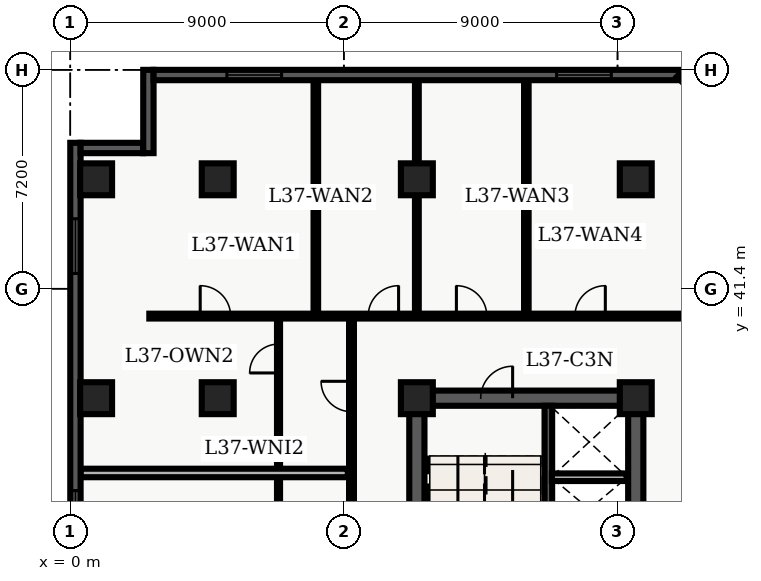
"""IFC4 building model, lengths in metres.
Left out: names, types, materials, properties, quantities, classifications, styles, units other than length and angle.
Written with IfcOpenShell. Run it as: python <this file> out.ifc"""

import sys

from ifc_helpers import new_model, entity, si_unit, converted_unit, direction, frame, origin_with_axes, origin_2d_with_axis, place, context, subcontext, project, spatial, polyline, rectangle, outline, extrude, element, fill, save


model = new_model("IFC4")
c1 = context("Model", 3, precision=1e-05, world=origin_with_axes(), true_north=direction((0.0, 1.0)))
c2 = subcontext(c1, "Body", "Model", "MODEL_VIEW")
j1 = project(units=[si_unit("LENGTHUNIT", "METRE"), converted_unit("PLANEANGLEUNIT", "DEGREE", entity("IfcPlaneAngleMeasure", 0.017), si_unit("PLANEANGLEUNIT", "RADIAN"), dimensions=[0, 0, 0, 0, 0, 0, 0])], contexts=[c1])
p1 = place(None, origin_with_axes())
s1 = spatial("IfcSite", under=j1, at=p1, CompositionType="ELEMENT")
p2 = place(p1, origin_with_axes())
s2 = spatial("IfcBuilding", under=s1, at=p2, CompositionType="ELEMENT")
p3 = place(p2, frame((0.0, 0.0, 152.4), z_axis=(0.0, 0.0, 1.0), x_axis=(1.0, 0.0, 0.0)))
s3 = spatial("IfcBuildingStorey", under=s2, at=p3, CompositionType="ELEMENT", Elevation=152.4)
p4 = place(p3, frame((11.4, 10.8, 0.0), z_axis=(0.0, 0.0, 1.0), x_axis=(0.0, 1.0, 0.0)))
e1 = element("IfcWall", 1, at=p4, inside=s3, PredefinedType="SHEAR", context=c2, shape_type="SweptSolid", body=[
    extrude(outline(polyline([(0.0, -0.25), (27.0, -0.25), (27.0, 0.25), (0.0, 0.25), (0.0, -0.25)])), origin_with_axes(), (0.0, 0.0, 1.0), 3.66),
])
p5 = place(p3, frame((11.4, 37.8, 0.0), z_axis=(0.0, 0.0, 1.0), x_axis=(1.0, 0.0, 0.0)))
e2 = element("IfcWall", 2, at=p5, inside=s3, PredefinedType="SHEAR", context=c2, shape_type="SweptSolid", body=[
    extrude(outline(polyline([(0.0, -0.25), (7.2, -0.25), (7.2, 0.25), (0.0, 0.25), (0.0, -0.25)])), origin_with_axes(), (0.0, 0.0, 1.0), 3.66),
])
p6 = place(p5, frame((2.625, 0.0, 0.0), z_axis=(0.0, 0.0, 1.0), x_axis=(1.0, 0.0, 0.0)))
e3 = element("IfcOpeningElement", 3, at=p6, cuts=e2, PredefinedType="OPENING", context=c2, shape_type="SweptSolid", body=[
    extrude(rectangle(XDim=1.05, YDim=0.52, at=origin_2d_with_axis()), origin_with_axes(), (0.0, 0.0, 1.0), 2.15),
])
p7 = place(p3, frame((18.6, 24.3, 0.0), z_axis=(0.0, 0.0, 1.0), x_axis=(0.0, 1.0, 0.0)))
e4 = element("IfcWall", 4, at=p7, inside=s3, PredefinedType="SHEAR", context=c2, shape_type="SweptSolid", body=[
    extrude(outline(polyline([(0.0, -0.25), (13.5, -0.25), (13.5, 0.25), (0.0, 0.25), (0.0, -0.25)])), origin_with_axes(), (0.0, 0.0, 1.0), 3.66),
])
p8 = place(p7, frame((5.65, 0.0, 0.0), z_axis=(0.0, 0.0, 1.0), x_axis=(1.0, 0.0, 0.0)))
e5 = element("IfcOpeningElement", 5, at=p8, cuts=e4, PredefinedType="OPENING", context=c2, shape_type="SweptSolid", body=[
    extrude(rectangle(XDim=1.1, YDim=0.52, at=origin_2d_with_axis()), origin_with_axes(), (0.0, 0.0, 1.0), 2.15),
])
p9 = place(p7, frame((7.75, 0.0, 0.0), z_axis=(0.0, 0.0, 1.0), x_axis=(1.0, 0.0, 0.0)))
e6 = element("IfcOpeningElement", 6, at=p9, cuts=e4, PredefinedType="OPENING", context=c2, shape_type="SweptSolid", body=[
    extrude(rectangle(XDim=1.1, YDim=0.52, at=origin_2d_with_axis()), origin_with_axes(), (0.0, 0.0, 1.0), 2.15),
])
p10 = place(p3, frame((15.725, 28.9, 0.0), z_axis=(0.0, 0.0, 1.0), x_axis=(0.0, 1.0, 0.0)))
e7 = element("IfcWall", 7, at=p10, inside=s3, PredefinedType="SHEAR", context=c2, shape_type="SweptSolid", body=[
    extrude(outline(polyline([(0.0, -0.125), (8.65, -0.125), (8.65, 0.125), (0.0, 0.125), (0.0, -0.125)])), origin_with_axes(), (0.0, 0.0, 1.0), 3.66),
])
for number, where, z_axis, x_axis in (
    (8, (11.4, 37.8, 0.0), (0.0, 0.0, 1.0), (1.0, 0.0, 0.0)),
    (9, (11.4, 45.0, 0.0), (0.0, 0.0, 1.0), (1.0, 0.0, 0.0)),
    (10, (18.6, 37.8, 0.0), (0.0, 0.0, 1.0), (1.0, 0.0, 0.0)),
    (11, (18.6, 45.0, 0.0), (0.0, 0.0, 1.0), (1.0, 0.0, 0.0)),
    (12, (4.85, 37.8, 0.0), (0.0, 0.0, 1.0), (1.0, 0.0, 0.0)),
    (13, (4.85, 45.0, 0.0), (0.0, 0.0, 1.0), (1.0, 0.0, 0.0)),
    (14, (0.85, 37.8, 0.0), (0.0, 0.0, 1.0), (1.0, 0.0, 0.0)),
    (15, (0.85, 45.0, 0.0), (0.0, 0.0, 1.0), (1.0, 0.0, 0.0)),
):
    element("IfcColumn", number, at=place(p3, frame(where, z_axis=z_axis, x_axis=x_axis)), inside=s3, PredefinedType="COLUMN", context=c2, shape_type="SweptSolid", body=[
        extrude(rectangle(XDim=1.05, YDim=1.05, at=origin_2d_with_axis()), origin_with_axes(), (0.0, 0.0, 1.0), 3.9),
    ])
p11 = place(p3, frame((15.84, 35.2, 0.0), z_axis=(0.0, 0.0, 1.0), x_axis=(1.0, 0.0, 0.0)))
e16 = element("IfcWall", 16, at=p11, inside=s3, PredefinedType="SOLIDWALL", context=c2, shape_type="SweptSolid", body=[
    extrude(outline(polyline([(0.0, -0.125), (2.46, -0.125), (2.46, 0.125), (0.0, 0.125), (0.0, -0.125)])), origin_with_axes(), (0.0, 0.0, 1.0), 2.7),
])
p12 = place(p3, frame((2.6, 40.5, 0.0), z_axis=(0.0, 0.0, 1.0), x_axis=(1.0, 0.0, 0.0)))
e17 = element("IfcWall", 17, at=p12, inside=s3, PredefinedType="PARTITIONING", context=c2, shape_type="SweptSolid", body=[
    extrude(outline(polyline([(0.0, -0.08), (19.792, -0.08), (19.792, 0.08), (0.0, 0.08), (0.0, -0.08)])), origin_with_axes(), (0.0, 0.0, 1.0), 2.7),
])
p13 = place(p12, frame((2.174, 0.0, 0.0), z_axis=(0.0, 0.0, 1.0), x_axis=(1.0, 0.0, 0.0)))
e18 = element("IfcOpeningElement", 18, at=p13, cuts=e17, PredefinedType="OPENING", context=c2, shape_type="SweptSolid", body=[
    extrude(rectangle(XDim=1.0, YDim=0.18, at=origin_2d_with_axis()), origin_with_axes(), (0.0, 0.0, 1.0), 2.15),
])
p14 = place(p12, frame((7.699, 0.0, 0.0), z_axis=(0.0, 0.0, 1.0), x_axis=(1.0, 0.0, 0.0)))
e19 = element("IfcOpeningElement", 19, at=p14, cuts=e17, PredefinedType="OPENING", context=c2, shape_type="SweptSolid", body=[
    extrude(rectangle(XDim=1.0, YDim=0.18, at=origin_2d_with_axis()), origin_with_axes(), (0.0, 0.0, 1.0), 2.15),
])
p15 = place(p12, frame((10.601, 0.0, 0.0), z_axis=(0.0, 0.0, 1.0), x_axis=(1.0, 0.0, 0.0)))
e20 = element("IfcOpeningElement", 20, at=p15, cuts=e17, PredefinedType="OPENING", context=c2, shape_type="SweptSolid", body=[
    extrude(rectangle(XDim=1.0, YDim=0.18, at=origin_2d_with_axis()), origin_with_axes(), (0.0, 0.0, 1.0), 2.15),
])
p16 = place(p12, frame((14.499, 0.0, 0.0), z_axis=(0.0, 0.0, 1.0), x_axis=(1.0, 0.0, 0.0)))
e21 = element("IfcOpeningElement", 21, at=p16, cuts=e17, PredefinedType="OPENING", context=c2, shape_type="SweptSolid", body=[
    extrude(rectangle(XDim=1.0, YDim=0.18, at=origin_2d_with_axis()), origin_with_axes(), (0.0, 0.0, 1.0), 2.15),
])
p17 = place(p3, frame((9.25, 24.4, 0.0), z_axis=(0.0, 0.0, 1.0), x_axis=(0.0, 1.0, 0.0)))
e22 = element("IfcWall", 22, at=p17, inside=s3, PredefinedType="PARTITIONING", context=c2, shape_type="SweptSolid", body=[
    extrude(outline(polyline([(0.0, -0.08), (16.1, -0.08), (16.1, 0.08), (0.0, 0.08), (0.0, -0.08)])), origin_with_axes(), (0.0, 0.0, 1.0), 2.7),
])
p18 = place(p17, frame((5.51, 0.0, 0.0), z_axis=(0.0, 0.0, 1.0), x_axis=(1.0, 0.0, 0.0)))
e23 = element("IfcOpeningElement", 23, at=p18, cuts=e22, PredefinedType="OPENING", context=c2, shape_type="SweptSolid", body=[
    extrude(rectangle(XDim=1.0, YDim=0.18, at=origin_2d_with_axis()), origin_with_axes(), (0.0, 0.0, 1.0), 2.15),
])
p19 = place(p17, frame((13.455, 0.0, 0.0), z_axis=(0.0, 0.0, 1.0), x_axis=(1.0, 0.0, 0.0)))
e24 = element("IfcOpeningElement", 24, at=p19, cuts=e22, PredefinedType="OPENING", context=c2, shape_type="SweptSolid", body=[
    extrude(rectangle(XDim=1.0, YDim=0.18, at=origin_2d_with_axis()), origin_with_axes(), (0.0, 0.0, 1.0), 2.15),
])
p20 = place(p3, frame((6.85, 24.55, 0.0), z_axis=(0.0, 0.0, 1.0), x_axis=(0.0, 1.0, 0.0)))
e25 = element("IfcWall", 25, at=p20, inside=s3, PredefinedType="PARTITIONING", context=c2, shape_type="SweptSolid", body=[
    extrude(outline(polyline([(0.0, -0.05), (15.75, -0.05), (15.75, 0.05), (0.0, 0.05), (0.0, -0.05)])), origin_with_axes(), (0.0, 0.0, 1.0), 2.7),
])
p21 = place(p20, frame((5.36, 0.0, 0.0), z_axis=(0.0, 0.0, 1.0), x_axis=(1.0, 0.0, 0.0)))
e26 = element("IfcOpeningElement", 26, at=p21, cuts=e25, PredefinedType="OPENING", context=c2, shape_type="SweptSolid", body=[
    extrude(rectangle(XDim=0.95, YDim=0.12, at=origin_2d_with_axis()), origin_with_axes(), (0.0, 0.0, 1.0), 2.15),
])
p22 = place(p20, frame((14.555, 0.0, 0.0), z_axis=(0.0, 0.0, 1.0), x_axis=(1.0, 0.0, 0.0)))
e27 = element("IfcOpeningElement", 27, at=p22, cuts=e25, PredefinedType="OPENING", context=c2, shape_type="SweptSolid", body=[
    extrude(rectangle(XDim=0.95, YDim=0.12, at=origin_2d_with_axis()), origin_with_axes(), (0.0, 0.0, 1.0), 2.15),
])
p23 = place(p3, frame((0.335, 35.34, 0.0), z_axis=(0.0, 0.0, 1.0), x_axis=(1.0, 0.0, 0.0)))
e28 = element("IfcWall", 28, at=p23, inside=s3, PredefinedType="PARTITIONING", context=c2, shape_type="SweptSolid", body=[
    extrude(outline(polyline([(0.0, -0.14), (8.795, -0.14), (8.795, 0.14), (0.0, 0.14), (0.0, -0.14)])), origin_with_axes(), (0.0, 0.0, 1.0), 2.7),
])
p24 = place(p3, frame((8.077, 40.6, 0.0), z_axis=(0.0, 0.0, 1.0), x_axis=(0.0, 1.0, 0.0)))
e29 = element("IfcWall", 29, at=p24, inside=s3, PredefinedType="PARTITIONING", context=c2, shape_type="SweptSolid", body=[
    extrude(outline(polyline([(0.0, -0.075), (7.665, -0.075), (7.665, 0.075), (0.0, 0.075), (0.0, -0.075)])), origin_with_axes(), (0.0, 0.0, 1.0), 2.7),
])
p25 = place(p3, frame((11.4, 40.6, 0.0), z_axis=(0.0, 0.0, 1.0), x_axis=(0.0, 1.0, 0.0)))
e30 = element("IfcWall", 30, at=p25, inside=s3, PredefinedType="PARTITIONING", context=c2, shape_type="SweptSolid", body=[
    extrude(outline(polyline([(0.0, -0.062), (7.665, -0.062), (7.665, 0.062), (0.0, 0.062), (0.0, -0.062)])), origin_with_axes(), (0.0, 0.0, 1.0), 2.7),
])
p26 = place(p3, frame((15.001, 40.6, 0.0), z_axis=(0.0, 0.0, 1.0), x_axis=(0.0, 1.0, 0.0)))
e31 = element("IfcWall", 31, at=p26, inside=s3, PredefinedType="PARTITIONING", context=c2, shape_type="SweptSolid", body=[
    extrude(outline(polyline([(0.0, -0.075), (7.665, -0.075), (7.665, 0.075), (0.0, 0.075), (0.0, -0.075)])), origin_with_axes(), (0.0, 0.0, 1.0), 2.7),
])
p27 = place(p3, frame((0.17, 2.74, 0.0), z_axis=(0.0, 0.0, 1.0), x_axis=(0.0, 1.0, 0.0)))
e32 = element("IfcWall", 32, at=p27, inside=s3, PredefinedType="SOLIDWALL", context=c2, shape_type="SweptSolid", body=[
    extrude(outline(polyline([(0.0, -0.17), (43.46, -0.17), (43.46, 0.17), (0.0, 0.17), (0.0, -0.17)])), origin_with_axes(), (0.0, 0.0, 1.0), 3.66),
])
p28 = place(p27, frame((2.948, 0.0, 0.45), z_axis=(0.0, 0.0, 1.0), x_axis=(1.0, 0.0, 0.0)))
e33 = element("IfcOpeningElement", 33, at=p28, cuts=e32, PredefinedType="OPENING", context=c2, shape_type="SweptSolid", body=[
    extrude(rectangle(XDim=1.8, YDim=0.36, at=origin_2d_with_axis()), origin_with_axes(), (0.0, 0.0, 1.0), 2.1),
])
p29 = place(p27, frame((12.339, 0.0, 0.45), z_axis=(0.0, 0.0, 1.0), x_axis=(1.0, 0.0, 0.0)))
e34 = element("IfcOpeningElement", 34, at=p29, cuts=e32, PredefinedType="OPENING", context=c2, shape_type="SweptSolid", body=[
    extrude(rectangle(XDim=1.8, YDim=0.36, at=origin_2d_with_axis()), origin_with_axes(), (0.0, 0.0, 1.0), 2.1),
])
p30 = place(p27, frame((26.426, 0.0, 0.45), z_axis=(0.0, 0.0, 1.0), x_axis=(1.0, 0.0, 0.0)))
e35 = element("IfcOpeningElement", 35, at=p30, cuts=e32, PredefinedType="OPENING", context=c2, shape_type="SweptSolid", body=[
    extrude(rectangle(XDim=1.8, YDim=0.36, at=origin_2d_with_axis()), origin_with_axes(), (0.0, 0.0, 1.0), 2.1),
])
p31 = place(p27, frame((31.121, 0.0, 0.45), z_axis=(0.0, 0.0, 1.0), x_axis=(1.0, 0.0, 0.0)))
e36 = element("IfcOpeningElement", 36, at=p31, cuts=e32, PredefinedType="OPENING", context=c2, shape_type="SweptSolid", body=[
    extrude(rectangle(XDim=1.8, YDim=0.36, at=origin_2d_with_axis()), origin_with_axes(), (0.0, 0.0, 1.0), 2.1),
])
p32 = place(p27, frame((40.062, 0.0, 0.45), z_axis=(0.0, 0.0, 1.0), x_axis=(1.0, 0.0, 0.0)))
e37 = element("IfcOpeningElement", 37, at=p32, cuts=e32, PredefinedType="OPENING", context=c2, shape_type="SweptSolid", body=[
    extrude(rectangle(XDim=1.8, YDim=0.36, at=origin_2d_with_axis()), origin_with_axes(), (0.0, 0.0, 1.0), 2.1),
])
p33 = place(p3, frame((0.34, 46.03, 0.0), z_axis=(0.0, 0.0, 1.0), x_axis=(1.0, 0.0, 0.0)))
e38 = element("IfcWall", 38, at=p33, inside=s3, PredefinedType="SOLIDWALL", context=c2, shape_type="SweptSolid", body=[
    extrude(outline(polyline([(0.0, -0.17), (2.06, -0.17), (2.06, 0.17), (0.0, 0.17), (0.0, -0.17)])), origin_with_axes(), (0.0, 0.0, 1.0), 3.66),
])
p34 = place(p3, frame((2.57, 45.86, 0.0), z_axis=(0.0, 0.0, 1.0), x_axis=(0.0, 1.0, 0.0)))
e39 = element("IfcWall", 39, at=p34, inside=s3, PredefinedType="SOLIDWALL", context=c2, shape_type="SweptSolid", body=[
    extrude(outline(polyline([(0.0, -0.17), (2.74, -0.17), (2.74, 0.17), (0.0, 0.17), (0.0, -0.17)])), origin_with_axes(), (0.0, 0.0, 1.0), 3.66),
])
p35 = place(p3, frame((2.74, 48.43, 0.0), z_axis=(0.0, 0.0, 1.0), x_axis=(1.0, 0.0, 0.0)))
e40 = element("IfcWall", 40, at=p35, inside=s3, PredefinedType="SOLIDWALL", context=c2, shape_type="SweptSolid", body=[
    extrude(outline(polyline([(0.0, -0.17), (17.467, -0.17), (17.467, 0.17), (0.0, 0.17), (0.0, -0.17)])), origin_with_axes(), (0.0, 0.0, 1.0), 3.66),
])
p36 = place(p35, frame((3.311, 0.0, 0.45), z_axis=(0.0, 0.0, 1.0), x_axis=(1.0, 0.0, 0.0)))
e41 = element("IfcOpeningElement", 41, at=p36, cuts=e40, PredefinedType="OPENING", context=c2, shape_type="SweptSolid", body=[
    extrude(rectangle(XDim=1.8, YDim=0.36, at=origin_2d_with_axis()), origin_with_axes(), (0.0, 0.0, 1.0), 2.1),
])
p37 = place(p35, frame((14.156, 0.0, 0.45), z_axis=(0.0, 0.0, 1.0), x_axis=(1.0, 0.0, 0.0)))
e42 = element("IfcOpeningElement", 42, at=p37, cuts=e40, PredefinedType="OPENING", context=c2, shape_type="SweptSolid", body=[
    extrude(rectangle(XDim=1.8, YDim=0.36, at=origin_2d_with_axis()), origin_with_axes(), (0.0, 0.0, 1.0), 2.1),
])
p38 = place(p3, frame((20.073, 48.494, 0.0), z_axis=(0.0, 0.0, 1.0), x_axis=(0.707107, -0.707107, 0.0)))
e43 = element("IfcWall", 43, at=p38, inside=s3, PredefinedType="SOLIDWALL", context=c2, shape_type="SweptSolid", body=[
    extrude(outline(polyline([(0.0, -0.17), (3.584, -0.17), (3.584, 0.17), (0.0, 0.17), (0.0, -0.17)])), origin_with_axes(), (0.0, 0.0, 1.0), 3.66),
])
p39 = place(p5, frame((2.625, 0.0, 0.0), z_axis=(0.0, 0.0, 1.0), x_axis=(1.0, 0.0, 0.0)))
e44 = element("IfcDoor", 44, at=p39, inside=s3, OperationType="SINGLE_SWING_RIGHT", PredefinedType="DOOR", context=c2, shape_type="SweptSolid", body=[
    extrude(rectangle(XDim=1.05, YDim=0.09, at=origin_2d_with_axis()), origin_with_axes(), (0.0, 0.0, 1.0), 2.15),
])
fill(e3, e44)
p40 = place(p20, frame((14.555, 0.0, 0.0), z_axis=(0.0, 0.0, 1.0), x_axis=(1.0, 0.0, 0.0)))
e45 = element("IfcDoor", 45, at=p40, inside=s3, OperationType="SINGLE_SWING_LEFT", PredefinedType="DOOR", context=c2, shape_type="SweptSolid", body=[
    extrude(rectangle(XDim=0.95, YDim=0.06, at=origin_2d_with_axis()), origin_with_axes(), (0.0, 0.0, 1.0), 2.15),
])
fill(e27, e45)
p41 = place(p17, frame((13.455, 0.0, 0.0), z_axis=(0.0, 0.0, 1.0), x_axis=(1.0, 0.0, 0.0)))
e46 = element("IfcDoor", 46, at=p41, inside=s3, OperationType="SINGLE_SWING_RIGHT", PredefinedType="DOOR", context=c2, shape_type="SweptSolid", body=[
    extrude(rectangle(XDim=1.0, YDim=0.09, at=origin_2d_with_axis()), origin_with_axes(), (0.0, 0.0, 1.0), 2.15),
])
fill(e24, e46)
p42 = place(p12, frame((2.174, 0.0, 0.0), z_axis=(0.0, 0.0, 1.0), x_axis=(1.0, 0.0, 0.0)))
e47 = element("IfcDoor", 47, at=p42, inside=s3, OperationType="SINGLE_SWING_LEFT", PredefinedType="DOOR", context=c2, shape_type="SweptSolid", body=[
    extrude(rectangle(XDim=1.0, YDim=0.09, at=origin_2d_with_axis()), origin_with_axes(), (0.0, 0.0, 1.0), 2.15),
])
fill(e18, e47)
p43 = place(p12, frame((7.699, 0.0, 0.0), z_axis=(0.0, 0.0, 1.0), x_axis=(1.0, 0.0, 0.0)))
e48 = element("IfcDoor", 48, at=p43, inside=s3, OperationType="SINGLE_SWING_RIGHT", PredefinedType="DOOR", context=c2, shape_type="SweptSolid", body=[
    extrude(rectangle(XDim=1.0, YDim=0.09, at=origin_2d_with_axis()), origin_with_axes(), (0.0, 0.0, 1.0), 2.15),
])
fill(e19, e48)
p44 = place(p12, frame((10.601, 0.0, 0.0), z_axis=(0.0, 0.0, 1.0), x_axis=(1.0, 0.0, 0.0)))
e49 = element("IfcDoor", 49, at=p44, inside=s3, OperationType="SINGLE_SWING_LEFT", PredefinedType="DOOR", context=c2, shape_type="SweptSolid", body=[
    extrude(rectangle(XDim=1.0, YDim=0.09, at=origin_2d_with_axis()), origin_with_axes(), (0.0, 0.0, 1.0), 2.15),
])
fill(e20, e49)
p45 = place(p12, frame((14.499, 0.0, 0.0), z_axis=(0.0, 0.0, 1.0), x_axis=(1.0, 0.0, 0.0)))
e50 = element("IfcDoor", 50, at=p45, inside=s3, OperationType="SINGLE_SWING_RIGHT", PredefinedType="DOOR", context=c2, shape_type="SweptSolid", body=[
    extrude(rectangle(XDim=1.0, YDim=0.09, at=origin_2d_with_axis()), origin_with_axes(), (0.0, 0.0, 1.0), 2.15),
])
fill(e21, e50)
p46 = place(p27, frame((31.121, 0.0, 0.45), z_axis=(0.0, 0.0, 1.0), x_axis=(1.0, 0.0, 0.0)))
e51 = element("IfcWindow", 51, at=p46, inside=s3, PredefinedType="WINDOW", context=c2, shape_type="SweptSolid", body=[
    extrude(rectangle(XDim=1.8, YDim=0.09, at=origin_2d_with_axis()), origin_with_axes(), (0.0, 0.0, 1.0), 2.1),
])
fill(e36, e51)
p47 = place(p27, frame((40.062, 0.0, 0.45), z_axis=(0.0, 0.0, 1.0), x_axis=(1.0, 0.0, 0.0)))
e52 = element("IfcWindow", 52, at=p47, inside=s3, PredefinedType="WINDOW", context=c2, shape_type="SweptSolid", body=[
    extrude(rectangle(XDim=1.8, YDim=0.09, at=origin_2d_with_axis()), origin_with_axes(), (0.0, 0.0, 1.0), 2.1),
])
fill(e37, e52)
p48 = place(p35, frame((3.311, 0.0, 0.45), z_axis=(0.0, 0.0, 1.0), x_axis=(1.0, 0.0, 0.0)))
e53 = element("IfcWindow", 53, at=p48, inside=s3, PredefinedType="WINDOW", context=c2, shape_type="SweptSolid", body=[
    extrude(rectangle(XDim=1.8, YDim=0.09, at=origin_2d_with_axis()), origin_with_axes(), (0.0, 0.0, 1.0), 2.1),
])
fill(e41, e53)
p49 = place(p35, frame((14.156, 0.0, 0.45), z_axis=(0.0, 0.0, 1.0), x_axis=(1.0, 0.0, 0.0)))
e54 = element("IfcWindow", 54, at=p49, inside=s3, PredefinedType="WINDOW", context=c2, shape_type="SweptSolid", body=[
    extrude(rectangle(XDim=1.8, YDim=0.09, at=origin_2d_with_axis()), origin_with_axes(), (0.0, 0.0, 1.0), 2.1),
])
fill(e42, e54)
save(model, sys.argv[1])
